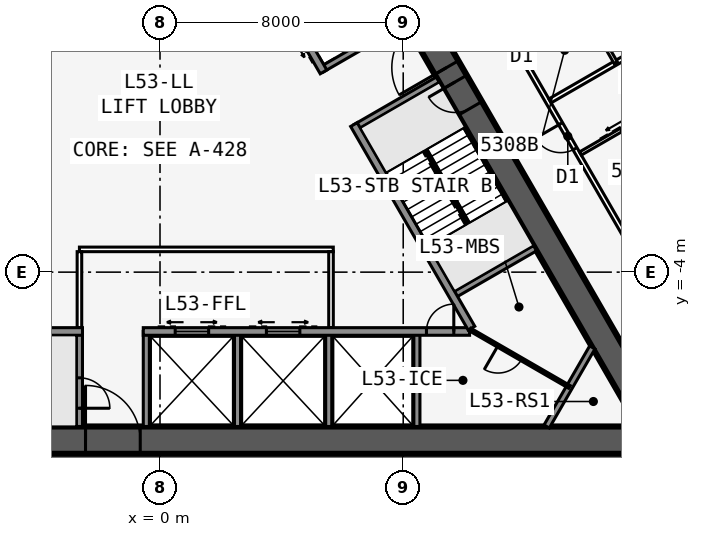
"""IFC4 building model, lengths in metres.
Left out: names, types, materials, properties, quantities, classifications, styles, units other than length and angle.
Written with IfcOpenShell. Run it as: python <this file> out.ifc"""

import sys

from ifc_helpers import new_model, si_unit, direction, frame, frame_2d, origin, place, context, subcontext, project, spatial, rectangle, extrude, element, fill, save


model = new_model("IFC4")
c1 = context("Model", 3, precision=1e-05, world=origin(), true_north=direction((0.0, 1.0)))
c2 = subcontext(c1, "Body", "Model", "MODEL_VIEW")
j1 = project(units=[si_unit("LENGTHUNIT", "METRE"), si_unit("PLANEANGLEUNIT", "RADIAN")], contexts=[c1])
p1 = place(None, origin())
s1 = spatial("IfcSite", under=j1, at=p1, CompositionType="ELEMENT")
p2 = place(p1, origin())
s2 = spatial("IfcBuilding", under=s1, at=p2, CompositionType="ELEMENT")
p3 = place(p2, frame((0.0, 0.0, 200.9)))
s3 = spatial("IfcBuildingStorey", under=s2, at=p3, CompositionType="ELEMENT", Elevation=200.9)
p4 = place(p3, frame((-16.5, -9.526, 0.0), z_axis=(0.0, 0.0, 1.0), x_axis=(1.0, 0.0, 0.0)))
e1 = element("IfcWall", 1, at=p4, inside=s3, PredefinedType="SHEAR", context=c2, shape_type="SweptSolid", body=[
    extrude(rectangle(XDim=33.0, YDim=0.9, at=frame_2d((16.5, 0.0))), origin(), (0.0, 0.0, 1.0), 3.6),
])
p5 = place(p4, frame((14.05, 0.0, 0.0)))
e2 = element("IfcOpeningElement", 2, at=p5, cuts=e1, PredefinedType="OPENING", context=c2, shape_type="SweptSolid", body=[
    extrude(rectangle(XDim=1.8, YDim=2.13, at=frame_2d((0.9, 1.065))), frame((0.0, 0.46, 0.0), z_axis=(0.0, -1.0, 0.0), x_axis=(1.0, 0.0, 0.0)), (0.0, 0.0, 1.0), 0.92),
])
p6 = place(p3, frame((-10.183, -5.951, 0.0), z_axis=(0.0, 0.0, 1.0), x_axis=(1.0, 0.0, 0.0)))
e3 = element("IfcWall", 3, at=p6, inside=s3, PredefinedType="SOLIDWALL", context=c2, shape_type="SweptSolid", body=[
    extrude(rectangle(XDim=7.633, YDim=0.25, at=frame_2d((3.816, 0.0))), origin(), (0.0, 0.0, 1.0), 3.435),
])
p7 = place(p3, frame((-0.55, -5.951, 0.0), z_axis=(0.0, 0.0, 1.0), x_axis=(1.0, 0.0, 0.0)))
e4 = element("IfcWall", 4, at=p7, inside=s3, PredefinedType="SOLIDWALL", context=c2, shape_type="SweptSolid", body=[
    extrude(rectangle(XDim=10.733, YDim=0.25, at=frame_2d((5.366, 0.0))), origin(), (0.0, 0.0, 1.0), 3.435),
])
p8 = place(p7, frame((9.314, 0.0, 0.0)))
e5 = element("IfcOpeningElement", 5, at=p8, cuts=e4, PredefinedType="OPENING", context=c2, shape_type="SweptSolid", body=[
    extrude(rectangle(XDim=0.9, YDim=2.13, at=frame_2d((0.45, 1.065))), frame((0.0, 0.135, 0.0), z_axis=(0.0, -1.0, 0.0), x_axis=(1.0, 0.0, 0.0)), (0.0, 0.0, 1.0), 0.27),
])
p9 = place(p7, frame((1.05, 0.0, 0.0)))
e6 = element("IfcOpeningElement", 6, at=p9, cuts=e4, PredefinedType="OPENING", context=c2, shape_type="SweptSolid", body=[
    extrude(rectangle(XDim=1.1, YDim=2.13, at=frame_2d((0.55, 1.065))), frame((0.0, 0.135, 0.0), z_axis=(0.0, -1.0, 0.0), x_axis=(1.0, 0.0, 0.0)), (0.0, 0.0, 1.0), 0.27),
])
p10 = place(p7, frame((4.05, 0.0, 0.0)))
e7 = element("IfcOpeningElement", 7, at=p10, cuts=e4, PredefinedType="OPENING", context=c2, shape_type="SweptSolid", body=[
    extrude(rectangle(XDim=1.1, YDim=2.13, at=frame_2d((0.55, 1.065))), frame((0.0, 0.135, 0.0), z_axis=(0.0, -1.0, 0.0), x_axis=(1.0, 0.0, 0.0)), (0.0, 0.0, 1.0), 0.27),
])
p11 = place(p3, frame((-2.65, -5.951, 0.0), z_axis=(0.0, 0.0, 1.0), x_axis=(0.0, -1.0, 0.0)))
e8 = element("IfcWall", 8, at=p11, inside=s3, PredefinedType="SOLIDWALL", context=c2, shape_type="SweptSolid", body=[
    extrude(rectangle(XDim=3.125, YDim=0.2, at=frame_2d((1.562, 0.0))), origin(), (0.0, 0.0, 1.0), 3.435),
])
p12 = place(p11, frame((1.525, 0.0, 0.0)))
e9 = element("IfcOpeningElement", 9, at=p12, cuts=e8, PredefinedType="OPENING", context=c2, shape_type="SweptSolid", body=[
    extrude(rectangle(XDim=1.0, YDim=2.13, at=frame_2d((0.5, 1.065))), frame((0.0, 0.11, 0.0), z_axis=(0.0, -1.0, 0.0), x_axis=(1.0, 0.0, 0.0)), (0.0, 0.0, 1.0), 0.22),
])
for number, where, z_axis, x_axis in (
    (10, (-0.45, -5.951, 0.0), (0.0, 0.0, 1.0), (0.0, -1.0, 0.0)),
    (11, (2.55, -5.951, 0.0), (0.0, 0.0, 1.0), (0.0, -1.0, 0.0)),
    (12, (5.55, -5.951, 0.0), (0.0, 0.0, 1.0), (0.0, -1.0, 0.0)),
    (13, (8.45, -5.951, 0.0), (0.0, 0.0, 1.0), (0.0, -1.0, 0.0)),
):
    element("IfcWall", number, at=place(p3, frame(where, z_axis=z_axis, x_axis=x_axis)), inside=s3, PredefinedType="SOLIDWALL", context=c2, shape_type="SweptSolid", body=[
        extrude(rectangle(XDim=3.125, YDim=0.2, at=frame_2d((1.562, 0.0))), origin(), (0.0, 0.0, 1.0), 3.435),
    ])
p13 = place(p3, frame((16.5, -9.526, 0.0), z_axis=(0.0, 0.0, 1.0), x_axis=(-0.499999749417, 0.866025548458, 0.0)))
e14 = element("IfcWall", 14, at=p13, inside=s3, PredefinedType="SHEAR", context=c2, shape_type="SweptSolid", body=[
    extrude(rectangle(XDim=33.0, YDim=0.9, at=frame_2d((16.5, 0.0))), origin(), (0.0, 0.0, 1.0), 3.6),
])
p14 = place(p13, frame((14.15, 0.0, 0.0)))
e15 = element("IfcOpeningElement", 15, at=p14, cuts=e14, PredefinedType="OPENING", context=c2, shape_type="SweptSolid", body=[
    extrude(rectangle(XDim=1.8, YDim=2.13, at=frame_2d((0.9, 1.065))), frame((0.0, 0.46, 0.0), z_axis=(0.0, -1.0, 0.0), x_axis=(1.0, 0.0, 0.0)), (0.0, 0.0, 1.0), 0.92),
])
p15 = place(p13, frame((12.6, 0.0, 0.0)))
e16 = element("IfcOpeningElement", 16, at=p15, cuts=e14, PredefinedType="OPENING", context=c2, shape_type="SweptSolid", body=[
    extrude(rectangle(XDim=1.0, YDim=2.13, at=frame_2d((0.5, 1.065))), frame((0.0, 0.46, 0.0), z_axis=(0.0, -1.0, 0.0), x_axis=(1.0, 0.0, 0.0)), (0.0, 0.0, 1.0), 0.92),
])
p16 = place(p3, frame((10.245, -5.843, 0.0), z_axis=(0.0, 0.0, 1.0), x_axis=(-0.499993009313, 0.866029439822, 0.0)))
e17 = element("IfcWall", 17, at=p16, inside=s3, PredefinedType="SOLIDWALL", context=c2, shape_type="SweptSolid", body=[
    extrude(rectangle(XDim=7.733, YDim=0.25, at=frame_2d((3.866, 0.0))), origin(), (0.0, 0.0, 1.0), 3.435),
])
p17 = place(p3, frame((5.379, 2.586, 0.0), z_axis=(0.0, 0.0, 1.0), x_axis=(-0.500001375892, 0.866024609411, 0.0)))
e18 = element("IfcWall", 18, at=p17, inside=s3, PredefinedType="SOLIDWALL", context=c2, shape_type="SweptSolid", body=[
    extrude(rectangle(XDim=10.633, YDim=0.25, at=frame_2d((5.316, 0.0))), origin(), (0.0, 0.0, 1.0), 3.435),
])
p18 = place(p17, frame((9.164, 0.0, 0.0)))
e19 = element("IfcOpeningElement", 19, at=p18, cuts=e18, PredefinedType="OPENING", context=c2, shape_type="SweptSolid", body=[
    extrude(rectangle(XDim=0.9, YDim=2.13, at=frame_2d((0.45, 1.065))), frame((0.0, 0.135, 0.0), z_axis=(0.0, -1.0, 0.0), x_axis=(1.0, 0.0, 0.0)), (0.0, 0.0, 1.0), 0.27),
])
p19 = place(p17, frame((1.0, 0.0, 0.0)))
e20 = element("IfcOpeningElement", 20, at=p19, cuts=e18, PredefinedType="OPENING", context=c2, shape_type="SweptSolid", body=[
    extrude(rectangle(XDim=1.1, YDim=2.13, at=frame_2d((0.55, 1.065))), frame((0.0, 0.135, 0.0), z_axis=(0.0, -1.0, 0.0), x_axis=(1.0, 0.0, 0.0)), (0.0, 0.0, 1.0), 0.27),
])
p20 = place(p17, frame((3.9, 0.0, 0.0)))
e21 = element("IfcOpeningElement", 21, at=p20, cuts=e18, PredefinedType="OPENING", context=c2, shape_type="SweptSolid", body=[
    extrude(rectangle(XDim=1.1, YDim=2.13, at=frame_2d((0.55, 1.065))), frame((0.0, 0.135, 0.0), z_axis=(0.0, -1.0, 0.0), x_axis=(1.0, 0.0, 0.0)), (0.0, 0.0, 1.0), 0.27),
])
p21 = place(p17, frame((6.8, 0.0, 0.0)))
e22 = element("IfcOpeningElement", 22, at=p21, cuts=e18, PredefinedType="OPENING", context=c2, shape_type="SweptSolid", body=[
    extrude(rectangle(XDim=1.1, YDim=2.13, at=frame_2d((0.55, 1.065))), frame((0.0, 0.135, 0.0), z_axis=(0.0, -1.0, 0.0), x_axis=(1.0, 0.0, 0.0)), (0.0, 0.0, 1.0), 0.27),
])
for number, where, z_axis, x_axis in (
    (23, (9.629, -4.775, 0.0), (0.0, 0.0, 1.0), (0.866, 0.5, 0.0)),
    (24, (6.429, 0.767, 0.0), (0.0, 0.0, 1.0), (0.866, 0.5, 0.0)),
    (25, (5.329, 2.673, 0.0), (0.0, 0.0, 1.0), (0.866, 0.5, 0.0)),
):
    element("IfcWall", number, at=place(p3, frame(where, z_axis=z_axis, x_axis=x_axis)), inside=s3, PredefinedType="SOLIDWALL", context=c2, shape_type="SweptSolid", body=[
        extrude(rectangle(XDim=3.125, YDim=0.2, at=frame_2d((1.562, 0.0))), origin(), (0.0, 0.0, 1.0), 3.435),
    ])
p22 = place(p3, frame((0.0, 19.052, 0.0), z_axis=(0.0, 0.0, 1.0), x_axis=(-0.499999749417, -0.866025548458, 0.0)))
e26 = element("IfcWall", 26, at=p22, inside=s3, PredefinedType="SHEAR", context=c2, shape_type="SweptSolid", body=[
    extrude(rectangle(XDim=33.0, YDim=0.9, at=frame_2d((16.5, 0.0))), origin(), (0.0, 0.0, 1.0), 3.6),
])
p23 = place(p22, frame((14.15, 0.0, 0.0)))
e27 = element("IfcOpeningElement", 27, at=p23, cuts=e26, PredefinedType="OPENING", context=c2, shape_type="SweptSolid", body=[
    extrude(rectangle(XDim=1.8, YDim=2.13, at=frame_2d((0.9, 1.065))), frame((0.0, 0.46, 0.0), z_axis=(0.0, -1.0, 0.0), x_axis=(1.0, 0.0, 0.0)), (0.0, 0.0, 1.0), 0.92),
])
p24 = place(p22, frame((12.6, 0.0, 0.0)))
e28 = element("IfcOpeningElement", 28, at=p24, cuts=e26, PredefinedType="OPENING", context=c2, shape_type="SweptSolid", body=[
    extrude(rectangle(XDim=1.0, YDim=2.13, at=frame_2d((0.5, 1.065))), frame((0.0, 0.46, 0.0), z_axis=(0.0, -1.0, 0.0), x_axis=(1.0, 0.0, 0.0)), (0.0, 0.0, 1.0), 0.92),
])
p25 = place(p3, frame((20.027, -10.985, 0.0), z_axis=(0.0, 0.0, 1.0), x_axis=(-0.500001677587, 0.866024435227, 0.0)))
e29 = element("IfcWall", 29, at=p25, inside=s3, PredefinedType="PARTITIONING", context=c2, shape_type="SweptSolid", body=[
    extrude(rectangle(XDim=39.054, YDim=0.15, at=frame_2d((19.527, 0.0))), origin(), (0.0, 0.0, 1.0), 3.435),
])
p26 = place(p25, frame((1.558, 0.0, 0.0)))
e30 = element("IfcOpeningElement", 30, at=p26, cuts=e29, PredefinedType="OPENING", context=c2, shape_type="SweptSolid", body=[
    extrude(rectangle(XDim=0.95, YDim=2.13, at=frame_2d((0.475, 1.065))), frame((0.0, 0.085, 0.0), z_axis=(0.0, -1.0, 0.0), x_axis=(1.0, 0.0, 0.0)), (0.0, 0.0, 1.0), 0.17),
])
p27 = place(p25, frame((12.752, 0.0, 0.0)))
e31 = element("IfcOpeningElement", 31, at=p27, cuts=e29, PredefinedType="OPENING", context=c2, shape_type="SweptSolid", body=[
    extrude(rectangle(XDim=0.95, YDim=2.13, at=frame_2d((0.475, 1.065))), frame((0.0, 0.085, 0.0), z_axis=(0.0, -1.0, 0.0), x_axis=(1.0, 0.0, 0.0)), (0.0, 0.0, 1.0), 0.17),
])
p28 = place(p25, frame((17.152, 0.0, 0.0)))
e32 = element("IfcOpeningElement", 32, at=p28, cuts=e29, PredefinedType="OPENING", context=c2, shape_type="SweptSolid", body=[
    extrude(rectangle(XDim=0.95, YDim=2.13, at=frame_2d((0.475, 1.065))), frame((0.0, 0.085, 0.0), z_axis=(0.0, -1.0, 0.0), x_axis=(1.0, 0.0, 0.0)), (0.0, 0.0, 1.0), 0.17),
])
p29 = place(p25, frame((22.752, 0.0, 0.0)))
e33 = element("IfcOpeningElement", 33, at=p29, cuts=e29, PredefinedType="OPENING", context=c2, shape_type="SweptSolid", body=[
    extrude(rectangle(XDim=0.95, YDim=2.13, at=frame_2d((0.475, 1.065))), frame((0.0, 0.085, 0.0), z_axis=(0.0, -1.0, 0.0), x_axis=(1.0, 0.0, 0.0)), (0.0, 0.0, 1.0), 0.17),
])
p30 = place(p25, frame((32.152, 0.0, 0.0)))
e34 = element("IfcOpeningElement", 34, at=p30, cuts=e29, PredefinedType="OPENING", context=c2, shape_type="SweptSolid", body=[
    extrude(rectangle(XDim=0.95, YDim=2.13, at=frame_2d((0.475, 1.065))), frame((0.0, 0.085, 0.0), z_axis=(0.0, -1.0, 0.0), x_axis=(1.0, 0.0, 0.0)), (0.0, 0.0, 1.0), 0.17),
])
p31 = place(p25, frame((37.152, 0.0, 0.0)))
e35 = element("IfcOpeningElement", 35, at=p31, cuts=e29, PredefinedType="OPENING", context=c2, shape_type="SweptSolid", body=[
    extrude(rectangle(XDim=0.95, YDim=2.13, at=frame_2d((0.475, 1.065))), frame((0.0, 0.085, 0.0), z_axis=(0.0, -1.0, 0.0), x_axis=(1.0, 0.0, 0.0)), (0.0, 0.0, 1.0), 0.17),
])
p32 = place(p3, frame((12.829, 1.633, 0.0), z_axis=(0.0, 0.0, 1.0), x_axis=(0.866030558329, 0.49999107196, 0.0)))
e36 = element("IfcWall", 36, at=p32, inside=s3, PredefinedType="PARTITIONING", context=c2, shape_type="SweptSolid", body=[
    extrude(rectangle(XDim=7.894, YDim=0.15, at=frame_2d((3.947, 0.0))), origin(), (0.0, 0.0, 1.0), 2.589),
])
p33 = place(p3, frame((13.829, -0.099, 0.0), z_axis=(0.0, 0.0, 1.0), x_axis=(0.865997131366, 0.500048966069, 0.0)))
e37 = element("IfcWall", 37, at=p33, inside=s3, PredefinedType="PLUMBINGWALL", context=c2, shape_type="SweptSolid", body=[
    extrude(rectangle(XDim=2.74, YDim=0.12, at=frame_2d((1.37, 0.0))), origin(), (0.0, 0.0, 1.0), 3.435),
])
p34 = place(p33, frame((1.55, 0.0, 0.0)))
e38 = element("IfcOpeningElement", 38, at=p34, cuts=e37, PredefinedType="OPENING", context=c2, shape_type="SweptSolid", body=[
    extrude(rectangle(XDim=0.9, YDim=2.13, at=frame_2d((0.45, 1.065))), frame((0.0, 0.07, 0.0), z_axis=(0.0, -1.0, 0.0), x_axis=(1.0, 0.0, 0.0)), (0.0, 0.0, 1.0), 0.14),
])
p35 = place(p3, frame((14.993, 2.883, 0.0), z_axis=(0.0, 0.0, 1.0), x_axis=(-0.500001309137, 0.866024647952, 0.0)))
e39 = element("IfcWall", 39, at=p35, inside=s3, PredefinedType="PLUMBINGWALL", context=c2, shape_type="SweptSolid", body=[
    extrude(rectangle(XDim=2.4, YDim=0.12, at=frame_2d((1.2, 0.0))), origin(), (0.0, 0.0, 1.0), 3.435),
])
p36 = place(p3, frame((-0.5, 22.836, 0.0), z_axis=(0.0, 0.0, 1.0), x_axis=(-0.500001677587, -0.866024435227, 0.0)))
e40 = element("IfcWall", 40, at=p36, inside=s3, PredefinedType="PARTITIONING", context=c2, shape_type="SweptSolid", body=[
    extrude(rectangle(XDim=39.054, YDim=0.15, at=frame_2d((19.527, 0.0))), origin(), (0.0, 0.0, 1.0), 3.435),
])
p37 = place(p36, frame((0.952, 0.0, 0.0)))
e41 = element("IfcOpeningElement", 41, at=p37, cuts=e40, PredefinedType="OPENING", context=c2, shape_type="SweptSolid", body=[
    extrude(rectangle(XDim=0.95, YDim=2.13, at=frame_2d((0.475, 1.065))), frame((0.0, 0.085, 0.0), z_axis=(0.0, -1.0, 0.0), x_axis=(1.0, 0.0, 0.0)), (0.0, 0.0, 1.0), 0.17),
])
p38 = place(p36, frame((7.752, 0.0, 0.0)))
e42 = element("IfcOpeningElement", 42, at=p38, cuts=e40, PredefinedType="OPENING", context=c2, shape_type="SweptSolid", body=[
    extrude(rectangle(XDim=0.95, YDim=2.13, at=frame_2d((0.475, 1.065))), frame((0.0, 0.085, 0.0), z_axis=(0.0, -1.0, 0.0), x_axis=(1.0, 0.0, 0.0)), (0.0, 0.0, 1.0), 0.17),
])
p39 = place(p36, frame((17.152, 0.0, 0.0)))
e43 = element("IfcOpeningElement", 43, at=p39, cuts=e40, PredefinedType="OPENING", context=c2, shape_type="SweptSolid", body=[
    extrude(rectangle(XDim=0.95, YDim=2.13, at=frame_2d((0.475, 1.065))), frame((0.0, 0.085, 0.0), z_axis=(0.0, -1.0, 0.0), x_axis=(1.0, 0.0, 0.0)), (0.0, 0.0, 1.0), 0.17),
])
p40 = place(p36, frame((26.552, 0.0, 0.0)))
e44 = element("IfcOpeningElement", 44, at=p40, cuts=e40, PredefinedType="OPENING", context=c2, shape_type="SweptSolid", body=[
    extrude(rectangle(XDim=0.95, YDim=2.13, at=frame_2d((0.475, 1.065))), frame((0.0, 0.085, 0.0), z_axis=(0.0, -1.0, 0.0), x_axis=(1.0, 0.0, 0.0)), (0.0, 0.0, 1.0), 0.17),
])
p41 = place(p36, frame((37.152, 0.0, 0.0)))
e45 = element("IfcOpeningElement", 45, at=p41, cuts=e40, PredefinedType="OPENING", context=c2, shape_type="SweptSolid", body=[
    extrude(rectangle(XDim=0.95, YDim=2.13, at=frame_2d((0.475, 1.065))), frame((0.0, 0.085, 0.0), z_axis=(0.0, -1.0, 0.0), x_axis=(1.0, 0.0, 0.0)), (0.0, 0.0, 1.0), 0.17),
])
p42 = place(p3, frame((-2.65, -3.251, 0.0), z_axis=(0.0, 0.0, 1.0), x_axis=(1.0, 0.0, 0.0)))
e46 = element("IfcWall", 46, at=p42, inside=s3, PredefinedType="PARTITIONING", context=c2, shape_type="SweptSolid", body=[
    extrude(rectangle(XDim=8.35, YDim=0.15, at=frame_2d((4.175, 0.0))), origin(), (0.0, 0.0, 1.0), 3.435),
])
for number, where, z_axis, x_axis in (
    (47, (-2.65, -5.826, 0.0), (0.0, 0.0, 1.0), (0.0, 1.0, 0.0)),
    (48, (5.625, -5.826, 0.0), (0.0, 0.0, 1.0), (0.0, 1.0, 0.0)),
):
    element("IfcWall", number, at=place(p3, frame(where, z_axis=z_axis, x_axis=x_axis)), inside=s3, PredefinedType="PARTITIONING", context=c2, shape_type="SweptSolid", body=[
        extrude(rectangle(XDim=2.5, YDim=0.15, at=frame_2d((1.25, 0.0))), origin(), (0.0, 0.0, 1.0), 3.435),
    ])
p43 = place(p3, frame((14.219, -6.476, 0.0), z_axis=(0.0, 0.0, 1.0), x_axis=(-0.499952404951, -0.866052881055, 0.0)))
e49 = element("IfcWall", 49, at=p43, inside=s3, PredefinedType="SOLIDWALL", context=c2, shape_type="SweptSolid", body=[
    extrude(rectangle(XDim=3.002, YDim=0.2, at=frame_2d((1.501, 0.0))), origin(), (0.0, 0.0, 1.0), 3.435),
])
p44 = place(p3, frame((13.469, -7.776, 0.0), z_axis=(0.0, 0.0, 1.0), x_axis=(-0.866021898093, 0.500006071987, 0.0)))
e50 = element("IfcWall", 50, at=p44, inside=s3, PredefinedType="PARTITIONING", context=c2, shape_type="SweptSolid", body=[
    extrude(rectangle(XDim=3.775, YDim=0.1, at=frame_2d((1.888, 0.0))), origin(), (0.0, 0.0, 1.0), 3.435),
])
p45 = place(p44, frame((1.815, 0.0, 0.0)))
e51 = element("IfcOpeningElement", 51, at=p45, cuts=e50, PredefinedType="OPENING", context=c2, shape_type="SweptSolid", body=[
    extrude(rectangle(XDim=0.9, YDim=2.13, at=frame_2d((0.45, 1.065))), frame((0.0, 0.06, 0.0), z_axis=(0.0, -1.0, 0.0), x_axis=(1.0, 0.0, 0.0)), (0.0, 0.0, 1.0), 0.12),
])
p46 = place(p3, frame((10.135, -2.401, 0.0), z_axis=(0.0, 0.0, 1.0), x_axis=(-0.499992232847, 0.866029888106, 0.0)))
e52 = element("IfcWall", 52, at=p46, inside=s3, PredefinedType="SOLIDWALL", context=c2, shape_type="SweptSolid", body=[
    extrude(rectangle(XDim=2.794, YDim=0.1, at=frame_2d((1.397, 0.0))), origin(), (0.0, 0.0, 1.0), 3.6),
])
p47 = place(p34, origin())
e53 = element("IfcDoor", 53, at=p47, inside=s3, OperationType="SLIDING_TO_LEFT", PredefinedType="DOOR", context=c2, shape_type="SweptSolid", body=[
    extrude(rectangle(XDim=0.9, YDim=2.13, at=frame_2d((0.45, 1.065))), frame((0.0, 0.025, 0.0), z_axis=(0.0, -1.0, 0.0), x_axis=(1.0, 0.0, 0.0)), (0.0, 0.0, 1.0), 0.05),
])
fill(e38, e53)
p48 = place(p27, origin())
e54 = element("IfcDoor", 54, at=p48, inside=s3, OperationType="SINGLE_SWING_RIGHT", PredefinedType="DOOR", context=c2, shape_type="SweptSolid", body=[
    extrude(rectangle(XDim=0.95, YDim=2.13, at=frame_2d((0.475, 1.065))), frame((0.0, 0.025, 0.0), z_axis=(0.0, -1.0, 0.0), x_axis=(1.0, 0.0, 0.0)), (0.0, 0.0, 1.0), 0.05),
])
fill(e31, e54)
p49 = place(p5, origin())
e55 = element("IfcDoor", 55, at=p49, inside=s3, OperationType="DOUBLE_DOOR_SINGLE_SWING", PredefinedType="DOOR", context=c2, shape_type="SweptSolid", body=[
    extrude(rectangle(XDim=1.8, YDim=2.13, at=frame_2d((0.9, 1.065))), frame((0.0, 0.025, 0.0), z_axis=(0.0, -1.0, 0.0), x_axis=(1.0, 0.0, 0.0)), (0.0, 0.0, 1.0), 0.05),
])
fill(e2, e55)
p50 = place(p12, origin())
e56 = element("IfcDoor", 56, at=p50, inside=s3, OperationType="SINGLE_SWING_RIGHT", PredefinedType="DOOR", context=c2, shape_type="SweptSolid", body=[
    extrude(rectangle(XDim=1.0, YDim=2.13, at=frame_2d((0.5, 1.065))), frame((0.0, 0.025, 0.0), z_axis=(0.0, -1.0, 0.0), x_axis=(1.0, 0.0, 0.0)), (0.0, 0.0, 1.0), 0.05),
])
fill(e9, e56)
p51 = place(p14, origin())
e57 = element("IfcDoor", 57, at=p51, inside=s3, OperationType="DOUBLE_DOOR_SINGLE_SWING", PredefinedType="DOOR", context=c2, shape_type="SweptSolid", body=[
    extrude(rectangle(XDim=1.8, YDim=2.13, at=frame_2d((0.9, 1.065))), frame((0.0, 0.025, 0.0), z_axis=(0.0, -1.0, 0.0), x_axis=(1.0, 0.0, 0.0)), (0.0, 0.0, 1.0), 0.05),
])
fill(e15, e57)
p52 = place(p15, origin())
e58 = element("IfcDoor", 58, at=p52, inside=s3, OperationType="SINGLE_SWING_RIGHT", PredefinedType="DOOR", context=c2, shape_type="SweptSolid", body=[
    extrude(rectangle(XDim=1.0, YDim=2.13, at=frame_2d((0.5, 1.065))), frame((0.0, 0.025, 0.0), z_axis=(0.0, -1.0, 0.0), x_axis=(1.0, 0.0, 0.0)), (0.0, 0.0, 1.0), 0.05),
])
fill(e16, e58)
p53 = place(p8, origin())
e59 = element("IfcDoor", 59, at=p53, inside=s3, OperationType="SINGLE_SWING_RIGHT", PredefinedType="DOOR", context=c2, shape_type="SweptSolid", body=[
    extrude(rectangle(XDim=0.9, YDim=2.13, at=frame_2d((0.45, 1.065))), frame((0.0, 0.025, 0.0), z_axis=(0.0, -1.0, 0.0), x_axis=(1.0, 0.0, 0.0)), (0.0, 0.0, 1.0), 0.05),
])
fill(e5, e59)
p54 = place(p45, origin())
e60 = element("IfcDoor", 60, at=p54, inside=s3, OperationType="SINGLE_SWING_RIGHT", PredefinedType="DOOR", context=c2, shape_type="SweptSolid", body=[
    extrude(rectangle(XDim=0.9, YDim=2.13, at=frame_2d((0.45, 1.065))), frame((0.0, 0.025, 0.0), z_axis=(0.0, -1.0, 0.0), x_axis=(1.0, 0.0, 0.0)), (0.0, 0.0, 1.0), 0.05),
])
fill(e51, e60)
p55 = place(p9, origin())
e61 = element("IfcDoor", 61, at=p55, inside=s3, OperationType="DOUBLE_DOOR_SLIDING", PredefinedType="USERDEFINED", context=c2, shape_type="SweptSolid", body=[
    extrude(rectangle(XDim=1.1, YDim=2.13, at=frame_2d((0.55, 1.065))), frame((0.0, 0.025, 0.0), z_axis=(0.0, -1.0, 0.0), x_axis=(1.0, 0.0, 0.0)), (0.0, 0.0, 1.0), 0.05),
])
fill(e6, e61)
p56 = place(p10, origin())
e62 = element("IfcDoor", 62, at=p56, inside=s3, OperationType="DOUBLE_DOOR_SLIDING", PredefinedType="USERDEFINED", context=c2, shape_type="SweptSolid", body=[
    extrude(rectangle(XDim=1.1, YDim=2.13, at=frame_2d((0.55, 1.065))), frame((0.0, 0.025, 0.0), z_axis=(0.0, -1.0, 0.0), x_axis=(1.0, 0.0, 0.0)), (0.0, 0.0, 1.0), 0.05),
])
fill(e7, e62)
save(model, sys.argv[1])
